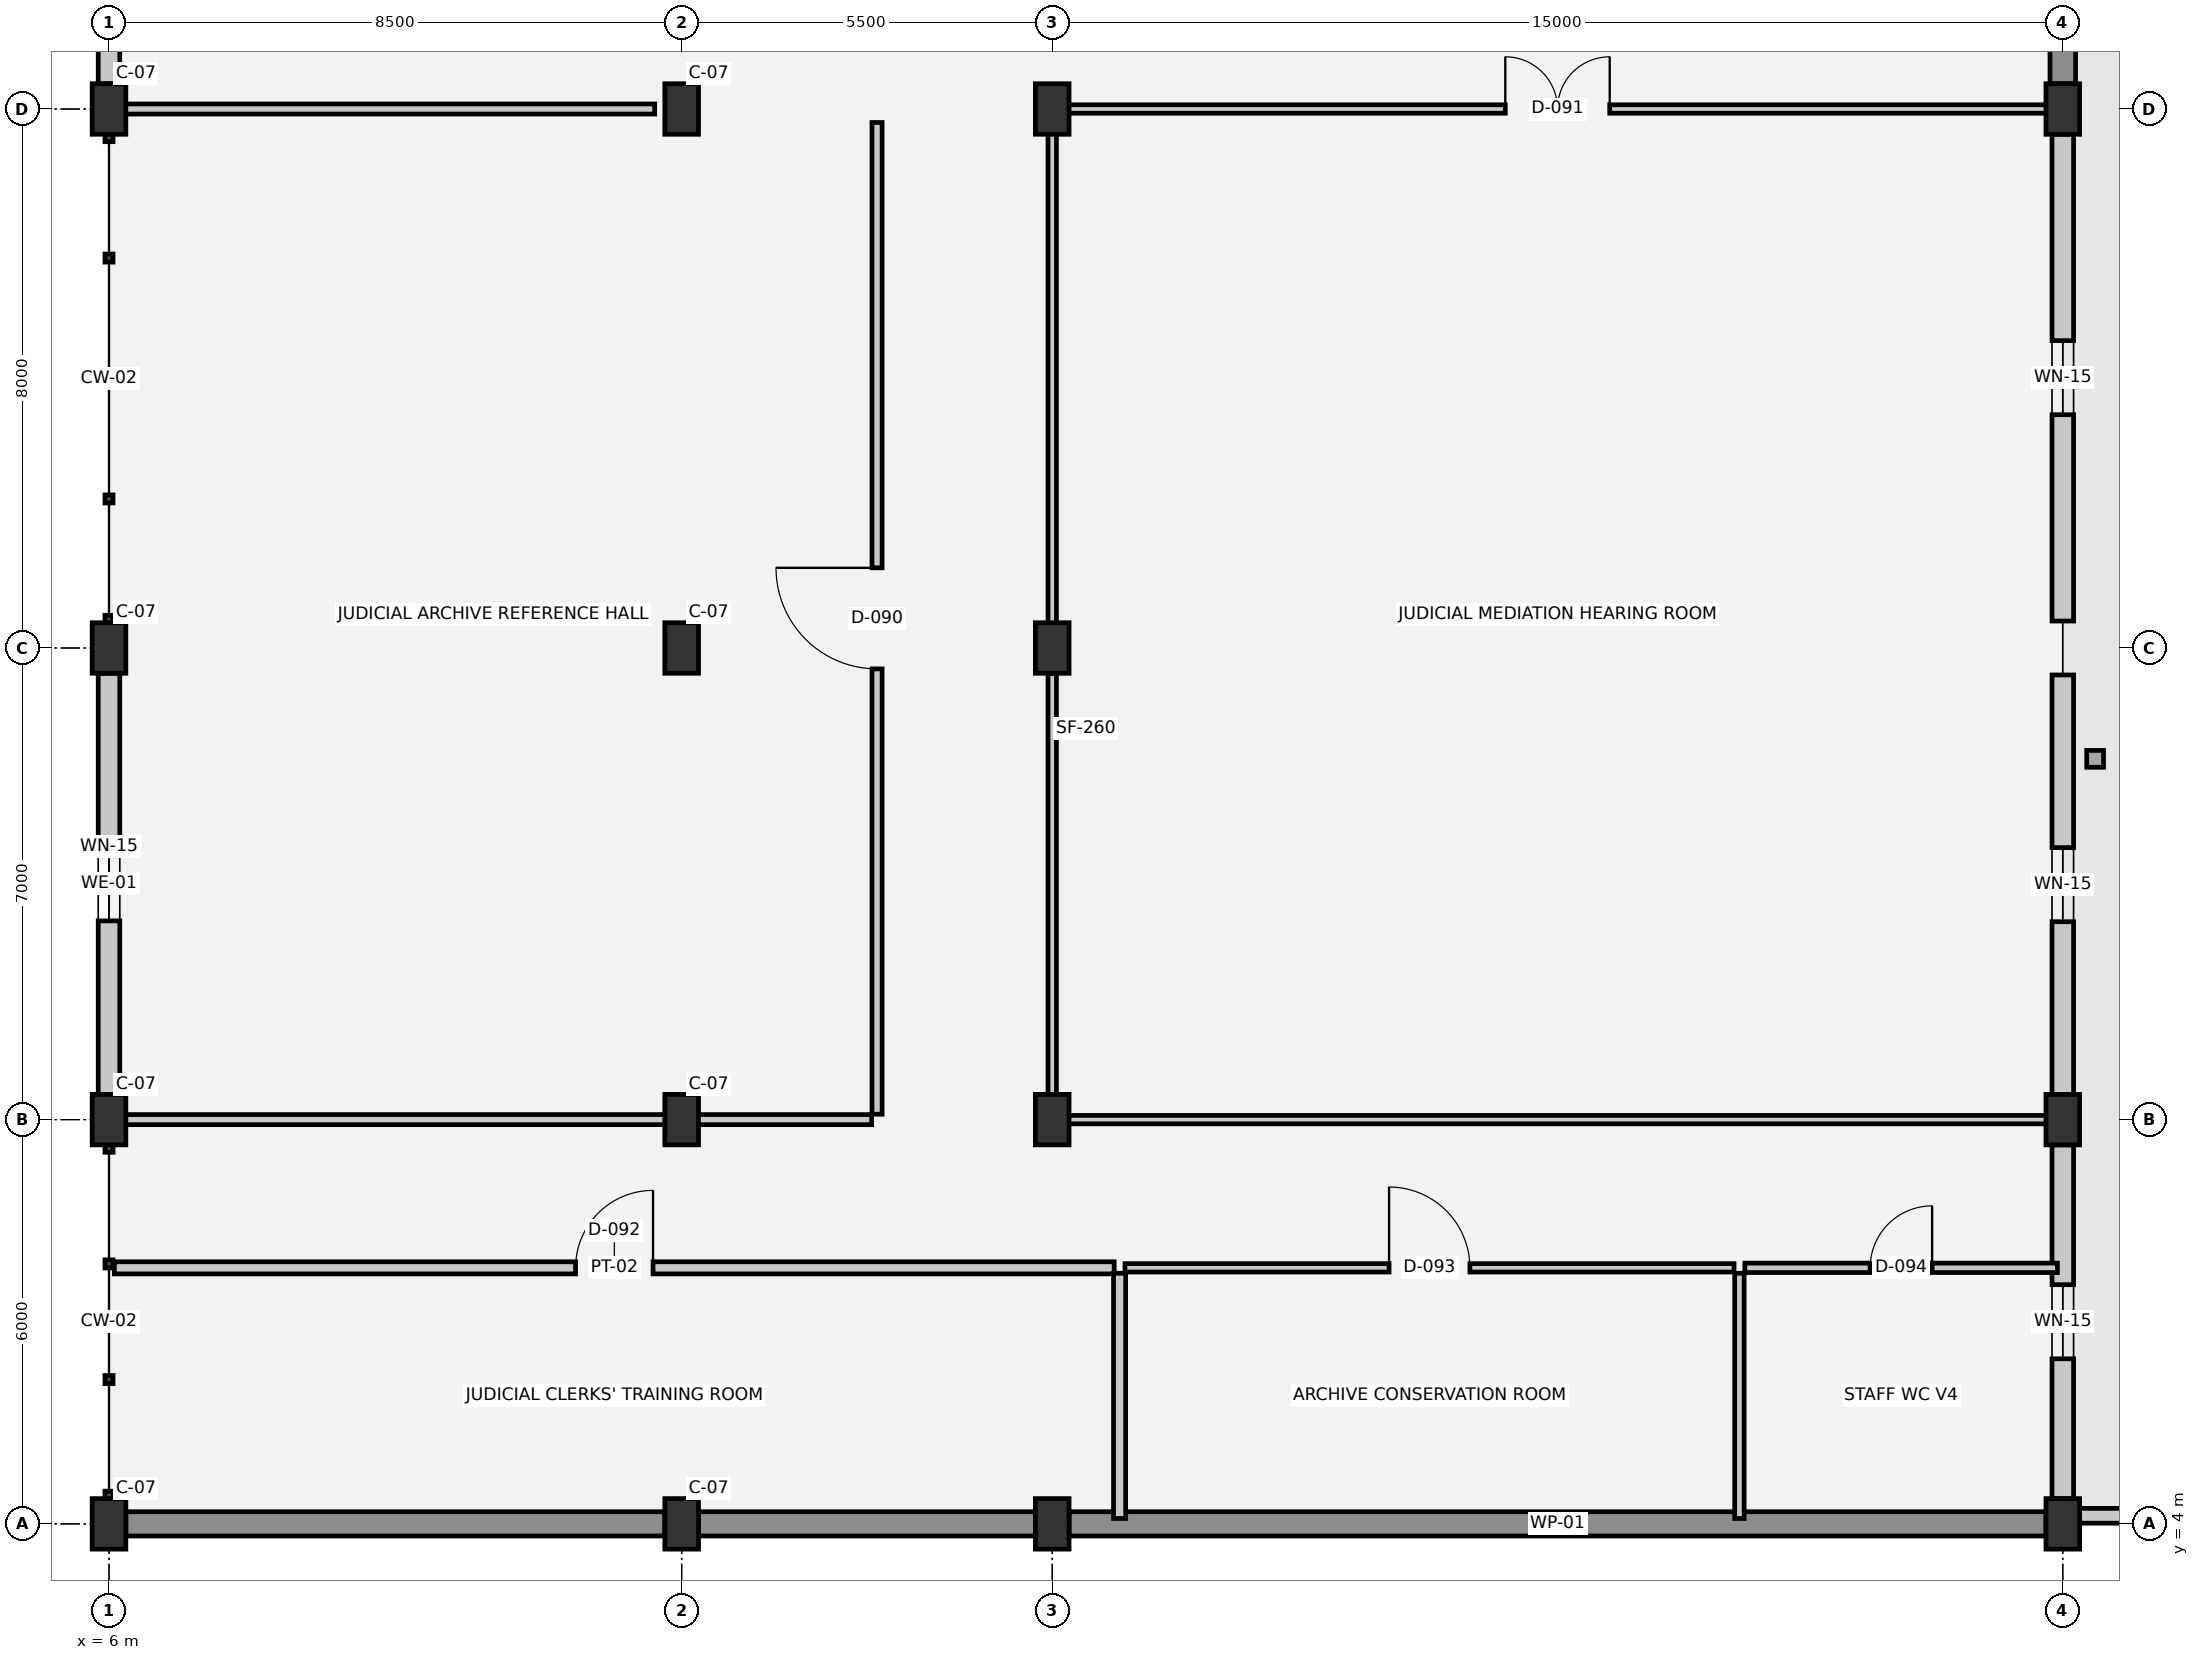
"""IFC4 building model, lengths in metres.
Left out: names, types, materials, properties, quantities, classifications, styles, units other than length and angle.
Written with IfcOpenShell. Run it as: python <this file> out.ifc"""

import sys

from ifc_helpers import new_model, si_unit, direction, frame, frame_2d, origin, origin_2d, place, context, subcontext, project, spatial, rectangle, extrude, element, fill, save


model = new_model("IFC4")
c1 = context("Model", 3, precision=1e-05, world=origin(), true_north=direction((0.0, 1.0)))
c2 = subcontext(c1, "Body", "Model", "MODEL_VIEW")
j1 = project(units=[si_unit("LENGTHUNIT", "METRE"), si_unit("PLANEANGLEUNIT", "RADIAN")], contexts=[c1])
p1 = place(None, origin())
s1 = spatial("IfcSite", under=j1, at=p1, CompositionType="ELEMENT")
p2 = place(p1, origin())
s2 = spatial("IfcBuilding", under=s1, at=p2, CompositionType="ELEMENT")
p3 = place(p2, frame((0.0, 0.0, 18.3)))
s3 = spatial("IfcBuildingStorey", under=s2, at=p3, CompositionType="ELEMENT", Elevation=18.3)
for number, where, z_axis, x_axis in (
    (1, (6.0, 4.0, 0.0), (0.0, 0.0, 1.0), (1.0, 0.0, 0.0)),
    (2, (6.0, 10.0, 0.0), (0.0, 0.0, 1.0), (1.0, 0.0, 0.0)),
    (3, (6.0, 17.0, 0.0), (0.0, 0.0, 1.0), (1.0, 0.0, 0.0)),
    (4, (6.0, 25.0, 0.0), (0.0, 0.0, 1.0), (1.0, 0.0, 0.0)),
    (5, (14.5, 4.0, 0.0), (0.0, 0.0, 1.0), (1.0, 0.0, 0.0)),
    (6, (14.5, 10.0, 0.0), (0.0, 0.0, 1.0), (1.0, 0.0, 0.0)),
    (7, (14.5, 17.0, 0.0), (0.0, 0.0, 1.0), (1.0, 0.0, 0.0)),
    (8, (14.5, 25.0, 0.0), (0.0, 0.0, 1.0), (1.0, 0.0, 0.0)),
    (9, (20.0, 4.0, 0.0), (0.0, 0.0, 1.0), (1.0, 0.0, 0.0)),
    (10, (20.0, 10.0, 0.0), (0.0, 0.0, 1.0), (1.0, 0.0, 0.0)),
    (11, (20.0, 17.0, 0.0), (0.0, 0.0, 1.0), (1.0, 0.0, 0.0)),
    (12, (20.0, 25.0, 0.0), (0.0, 0.0, 1.0), (1.0, 0.0, 0.0)),
    (13, (35.0, 4.0, 0.0), (0.0, 0.0, 1.0), (1.0, 0.0, 0.0)),
    (14, (35.0, 10.0, 0.0), (0.0, 0.0, 1.0), (1.0, 0.0, 0.0)),
    (15, (35.0, 25.0, 0.0), (0.0, 0.0, 1.0), (1.0, 0.0, 0.0)),
):
    element("IfcColumn", number, at=place(p3, frame(where, z_axis=z_axis, x_axis=x_axis)), inside=s3, PredefinedType="COLUMN", context=c2, shape_type="SweptSolid", body=[
        extrude(rectangle(XDim=0.5, YDim=0.75, at=origin_2d()), origin(), (0.0, 0.0, 1.0), 3.75),
    ])
p4 = place(p3, frame((6.0, 10.375, 0.0), z_axis=(0.0, 0.0, 1.0), x_axis=(0.0, 1.0, 0.0)))
e16 = element("IfcWall", 16, at=p4, inside=s3, PredefinedType="SOLIDWALL", context=c2, shape_type="SweptSolid", body=[
    extrude(rectangle(XDim=6.25, YDim=0.32, at=frame_2d((3.125, 0.0))), origin(), (0.0, 0.0, 1.0), 2.35),
])
p5 = place(p4, frame((2.575, 0.0, 0.9)))
e17 = element("IfcOpeningElement", 17, at=p5, cuts=e16, PredefinedType="OPENING", context=c2, shape_type="SweptSolid", body=[
    extrude(rectangle(XDim=1.1, YDim=1.2, at=frame_2d((0.55, 0.6))), frame((0.0, 0.17, 0.0), z_axis=(0.0, -1.0, 0.0), x_axis=(1.0, 0.0, 0.0)), (0.0, 0.0, 1.0), 0.34),
])
p6 = place(p3, frame((6.0, 25.375, 0.0), z_axis=(0.0, 0.0, 1.0), x_axis=(0.0, 1.0, 0.0)))
e18 = element("IfcWall", 18, at=p6, inside=s3, PredefinedType="SOLIDWALL", context=c2, shape_type="SweptSolid", body=[
    extrude(rectangle(XDim=6.25, YDim=0.32, at=frame_2d((3.125, 0.0))), origin(), (0.0, 0.0, 1.0), 2.35),
])
p7 = place(p3, frame((35.0, 31.625, 0.0), z_axis=(0.0, 0.0, 1.0), x_axis=(0.0, -1.0, 0.0)))
e19 = element("IfcWall", 19, at=p7, inside=s3, PredefinedType="STANDARD", context=c2, shape_type="SweptSolid", body=[
    extrude(rectangle(XDim=6.25, YDim=0.38, at=frame_2d((3.125, 0.0))), origin(), (0.0, 0.0, 1.0), 2.35),
])
p8 = place(p3, frame((35.0, 24.625, 0.0), z_axis=(0.0, 0.0, 1.0), x_axis=(0.0, -1.0, 0.0)))
e20 = element("IfcWall", 20, at=p8, inside=s3, PredefinedType="SOLIDWALL", context=c2, shape_type="SweptSolid", body=[
    extrude(rectangle(XDim=7.225, YDim=0.32, at=frame_2d((3.613, 0.0))), origin(), (0.0, 0.0, 1.0), 2.35),
])
p9 = place(p8, frame((3.062, 0.0, 0.9)))
e21 = element("IfcOpeningElement", 21, at=p9, cuts=e20, PredefinedType="OPENING", context=c2, shape_type="SweptSolid", body=[
    extrude(rectangle(XDim=1.1, YDim=1.2, at=frame_2d((0.55, 0.6))), frame((0.0, 0.17, 0.0), z_axis=(0.0, -1.0, 0.0), x_axis=(1.0, 0.0, 0.0)), (0.0, 0.0, 1.0), 0.34),
])
p10 = place(p3, frame((35.0, 16.6, 0.0), z_axis=(0.0, 0.0, 1.0), x_axis=(0.0, -1.0, 0.0)))
e22 = element("IfcWall", 22, at=p10, inside=s3, PredefinedType="SOLIDWALL", context=c2, shape_type="SweptSolid", body=[
    extrude(rectangle(XDim=6.225, YDim=0.32, at=frame_2d((3.113, 0.0))), origin(), (0.0, 0.0, 1.0), 2.35),
])
p11 = place(p10, frame((2.562, 0.0, 0.9)))
e23 = element("IfcOpeningElement", 23, at=p11, cuts=e22, PredefinedType="OPENING", context=c2, shape_type="SweptSolid", body=[
    extrude(rectangle(XDim=1.1, YDim=1.2, at=frame_2d((0.55, 0.6))), frame((0.0, 0.17, 0.0), z_axis=(0.0, -1.0, 0.0), x_axis=(1.0, 0.0, 0.0)), (0.0, 0.0, 1.0), 0.34),
])
p12 = place(p3, frame((35.0, 9.625, 0.0), z_axis=(0.0, 0.0, 1.0), x_axis=(0.0, -1.0, 0.0)))
e24 = element("IfcWall", 24, at=p12, inside=s3, PredefinedType="SOLIDWALL", context=c2, shape_type="SweptSolid", body=[
    extrude(rectangle(XDim=5.25, YDim=0.32, at=frame_2d((2.625, 0.0))), origin(), (0.0, 0.0, 1.0), 2.35),
])
p13 = place(p12, frame((2.075, 0.0, 0.9)))
e25 = element("IfcOpeningElement", 25, at=p13, cuts=e24, PredefinedType="OPENING", context=c2, shape_type="SweptSolid", body=[
    extrude(rectangle(XDim=1.1, YDim=1.2, at=frame_2d((0.55, 0.6))), frame((0.0, 0.17, 0.0), z_axis=(0.0, -1.0, 0.0), x_axis=(1.0, 0.0, 0.0)), (0.0, 0.0, 1.0), 0.34),
])
p14 = place(p3, frame((34.75, 4.0, 0.0), z_axis=(0.0, 0.0, 1.0), x_axis=(-1.0, 0.0, 0.0)))
e26 = element("IfcWall", 26, at=p14, inside=s3, PredefinedType="SOLIDWALL", context=c2, shape_type="SweptSolid", body=[
    extrude(rectangle(XDim=14.5, YDim=0.36, at=frame_2d((7.25, 0.0))), origin(), (0.0, 0.0, 1.0), 3.47),
])
p15 = place(p3, frame((19.75, 4.0, 0.0), z_axis=(0.0, 0.0, 1.0), x_axis=(-1.0, 0.0, 0.0)))
e27 = element("IfcWall", 27, at=p15, inside=s3, PredefinedType="SOLIDWALL", context=c2, shape_type="SweptSolid", body=[
    extrude(rectangle(XDim=5.0, YDim=0.36, at=frame_2d((2.5, 0.0))), origin(), (0.0, 0.0, 1.0), 3.47),
])
p16 = place(p3, frame((14.25, 4.0, 0.0), z_axis=(0.0, 0.0, 1.0), x_axis=(-1.0, 0.0, 0.0)))
e28 = element("IfcWall", 28, at=p16, inside=s3, PredefinedType="SOLIDWALL", context=c2, shape_type="SweptSolid", body=[
    extrude(rectangle(XDim=8.0, YDim=0.36, at=frame_2d((4.0, 0.0))), origin(), (0.0, 0.0, 1.0), 3.47),
])
p17 = place(p3, frame((55.77, 4.12, 0.0), z_axis=(0.0, 0.0, 1.0), x_axis=(-1.0, 0.0, 0.0)))
e29 = element("IfcWall", 29, at=p17, inside=s3, PredefinedType="PARAPET", context=c2, shape_type="SweptSolid", body=[
    extrude(rectangle(XDim=20.54, YDim=0.22, at=frame_2d((10.27, 0.0))), origin(), (0.0, 0.0, 1.0), 0.9),
])
p18 = place(p3, frame((6.08, 7.8, 0.0), z_axis=(0.0, 0.0, 1.0), x_axis=(1.0, 0.0, 0.0)))
e30 = element("IfcWall", 30, at=p18, inside=s3, PredefinedType="PARTITIONING", context=c2, shape_type="SweptSolid", body=[
    extrude(rectangle(XDim=14.84, YDim=0.18, at=frame_2d((7.42, 0.0))), origin(), (0.0, 0.0, 1.0), 3.39),
])
p19 = place(p18, frame((6.845, 0.0, 0.0)))
e31 = element("IfcOpeningElement", 31, at=p19, cuts=e30, PredefinedType="OPENING", context=c2, shape_type="SweptSolid", body=[
    extrude(rectangle(XDim=1.15, YDim=2.2, at=frame_2d((0.575, 1.1))), frame((0.0, 0.1, 0.0), z_axis=(0.0, -1.0, 0.0), x_axis=(1.0, 0.0, 0.0)), (0.0, 0.0, 1.0), 0.2),
])
p20 = place(p3, frame((21.08, 7.8, 0.0), z_axis=(0.0, 0.0, 1.0), x_axis=(1.0, 0.0, 0.0)))
e32 = element("IfcWall", 32, at=p20, inside=s3, PredefinedType="PARTITIONING", context=c2, shape_type="SweptSolid", body=[
    extrude(rectangle(XDim=9.04, YDim=0.125, at=frame_2d((4.52, 0.0))), origin(), (0.0, 0.0, 1.0), 3.39),
])
p21 = place(p20, frame((3.92, 0.0, 0.0)))
e33 = element("IfcOpeningElement", 33, at=p21, cuts=e32, PredefinedType="OPENING", context=c2, shape_type="SweptSolid", body=[
    extrude(rectangle(XDim=1.2, YDim=2.15, at=frame_2d((0.6, 1.075))), frame((0.0, 0.073, 0.0), z_axis=(0.0, -1.0, 0.0), x_axis=(1.0, 0.0, 0.0)), (0.0, 0.0, 1.0), 0.145),
])
p22 = place(p3, frame((30.28, 7.8, 0.0), z_axis=(0.0, 0.0, 1.0), x_axis=(1.0, 0.0, 0.0)))
e34 = element("IfcWall", 34, at=p22, inside=s3, PredefinedType="PLUMBINGWALL", context=c2, shape_type="SweptSolid", body=[
    extrude(rectangle(XDim=4.64, YDim=0.14, at=frame_2d((2.32, 0.0))), origin(), (0.0, 0.0, 1.0), 3.39),
])
p23 = place(p22, frame((1.86, 0.0, 0.0)))
e35 = element("IfcOpeningElement", 35, at=p23, cuts=e34, PredefinedType="OPENING", context=c2, shape_type="SweptSolid", body=[
    extrude(rectangle(XDim=0.92, YDim=2.1, at=frame_2d((0.46, 1.05))), frame((0.0, 0.08, 0.0), z_axis=(0.0, -1.0, 0.0), x_axis=(1.0, 0.0, 0.0)), (0.0, 0.0, 1.0), 0.16),
])
p24 = place(p3, frame((6.08, 10.0, 0.0), z_axis=(0.0, 0.0, 1.0), x_axis=(1.0, 0.0, 0.0)))
e36 = element("IfcWall", 36, at=p24, inside=s3, PredefinedType="PARTITIONING", context=c2, shape_type="SweptSolid", body=[
    extrude(rectangle(XDim=11.24, YDim=0.15, at=frame_2d((5.62, 0.0))), origin(), (0.0, 0.0, 1.0), 2.77),
])
p25 = place(p3, frame((20.08, 10.0, 0.0), z_axis=(0.0, 0.0, 1.0), x_axis=(1.0, 0.0, 0.0)))
e37 = element("IfcWall", 37, at=p25, inside=s3, PredefinedType="PARTITIONING", context=c2, shape_type="SweptSolid", body=[
    extrude(rectangle(XDim=14.84, YDim=0.125, at=frame_2d((7.42, 0.0))), origin(), (0.0, 0.0, 1.0), 2.52),
])
p26 = place(p3, frame((6.08, 25.0, 0.0), z_axis=(0.0, 0.0, 1.0), x_axis=(1.0, 0.0, 0.0)))
e38 = element("IfcWall", 38, at=p26, inside=s3, PredefinedType="PARTITIONING", context=c2, shape_type="SweptSolid", body=[
    extrude(rectangle(XDim=8.02, YDim=0.15, at=frame_2d((4.01, 0.0))), origin(), (0.0, 0.0, 1.0), 2.77),
])
p27 = place(p3, frame((20.08, 25.0, 0.0), z_axis=(0.0, 0.0, 1.0), x_axis=(1.0, 0.0, 0.0)))
e39 = element("IfcWall", 39, at=p27, inside=s3, PredefinedType="PARTITIONING", context=c2, shape_type="SweptSolid", body=[
    extrude(rectangle(XDim=14.84, YDim=0.125, at=frame_2d((7.42, 0.0))), origin(), (0.0, 0.0, 1.0), 2.52),
])
p28 = place(p27, frame((6.645, 0.0, 0.0)))
e40 = element("IfcOpeningElement", 40, at=p28, cuts=e39, PredefinedType="OPENING", context=c2, shape_type="SweptSolid", body=[
    extrude(rectangle(XDim=1.55, YDim=2.25, at=frame_2d((0.775, 1.125))), frame((0.0, 0.073, 0.0), z_axis=(0.0, -1.0, 0.0), x_axis=(1.0, 0.0, 0.0)), (0.0, 0.0, 1.0), 0.145),
])
p29 = place(p3, frame((17.4, 10.08, 0.0), z_axis=(0.0, 0.0, 1.0), x_axis=(0.0, 1.0, 0.0)))
e41 = element("IfcWall", 41, at=p29, inside=s3, PredefinedType="PARTITIONING", context=c2, shape_type="SweptSolid", body=[
    extrude(rectangle(XDim=14.72, YDim=0.15, at=frame_2d((7.36, 0.0))), origin(), (0.0, 0.0, 1.0), 3.39),
])
p30 = place(p29, frame((6.61, 0.0, 0.0)))
e42 = element("IfcOpeningElement", 42, at=p30, cuts=e41, PredefinedType="OPENING", context=c2, shape_type="SweptSolid", body=[
    extrude(rectangle(XDim=1.5, YDim=2.25, at=frame_2d((0.75, 1.125))), frame((0.0, 0.085, 0.0), z_axis=(0.0, -1.0, 0.0), x_axis=(1.0, 0.0, 0.0)), (0.0, 0.0, 1.0), 0.17),
])
p31 = place(p3, frame((20.0, 10.08, 0.0), z_axis=(0.0, 0.0, 1.0), x_axis=(0.0, 1.0, 0.0)))
e43 = element("IfcWall", 43, at=p31, inside=s3, PredefinedType="PARTITIONING", context=c2, shape_type="SweptSolid", body=[
    extrude(rectangle(XDim=6.545, YDim=0.125, at=frame_2d((3.272, 0.0))), origin(), (0.0, 0.0, 1.0), 2.995),
])
p32 = place(p3, frame((20.0, 16.625, 0.0), z_axis=(0.0, 0.0, 1.0), x_axis=(0.0, 1.0, 0.0)))
e44 = element("IfcWall", 44, at=p32, inside=s3, PredefinedType="PARTITIONING", context=c2, shape_type="SweptSolid", body=[
    extrude(rectangle(XDim=8.295, YDim=0.125, at=frame_2d((4.147, 0.0))), origin(), (0.0, 0.0, 1.0), 2.77),
])
p33 = place(p3, frame((21.0, 4.08, 0.0), z_axis=(0.0, 0.0, 1.0), x_axis=(0.0, 1.0, 0.0)))
e45 = element("IfcWall", 45, at=p33, inside=s3, PredefinedType="PARTITIONING", context=c2, shape_type="SweptSolid", body=[
    extrude(rectangle(XDim=3.64, YDim=0.18, at=frame_2d((1.82, 0.0))), origin(), (0.0, 0.0, 1.0), 3.39),
])
p34 = place(p3, frame((30.2, 4.08, 0.0), z_axis=(0.0, 0.0, 1.0), x_axis=(0.0, 1.0, 0.0)))
e46 = element("IfcWall", 46, at=p34, inside=s3, PredefinedType="PLUMBINGWALL", context=c2, shape_type="SweptSolid", body=[
    extrude(rectangle(XDim=3.64, YDim=0.14, at=frame_2d((1.82, 0.0))), origin(), (0.0, 0.0, 1.0), 3.39),
])
p35 = place(p5, origin())
e47 = element("IfcWindow", 47, at=p35, inside=s3, PartitioningType="SINGLE_PANEL", PredefinedType="WINDOW", context=c2, shape_type="SweptSolid", body=[
    extrude(rectangle(XDim=1.1, YDim=1.2, at=frame_2d((0.55, 0.6))), frame((0.0, 0.03, 0.0), z_axis=(0.0, -1.0, 0.0), x_axis=(1.0, 0.0, 0.0)), (0.0, 0.0, 1.0), 0.06),
])
fill(e17, e47)
p36 = place(p9, origin())
e48 = element("IfcWindow", 48, at=p36, inside=s3, PartitioningType="SINGLE_PANEL", PredefinedType="WINDOW", context=c2, shape_type="SweptSolid", body=[
    extrude(rectangle(XDim=1.1, YDim=1.2, at=frame_2d((0.55, 0.6))), frame((0.0, 0.03, 0.0), z_axis=(0.0, -1.0, 0.0), x_axis=(1.0, 0.0, 0.0)), (0.0, 0.0, 1.0), 0.06),
])
fill(e21, e48)
p37 = place(p11, origin())
e49 = element("IfcWindow", 49, at=p37, inside=s3, PartitioningType="SINGLE_PANEL", PredefinedType="WINDOW", context=c2, shape_type="SweptSolid", body=[
    extrude(rectangle(XDim=1.1, YDim=1.2, at=frame_2d((0.55, 0.6))), frame((0.0, 0.03, 0.0), z_axis=(0.0, -1.0, 0.0), x_axis=(1.0, 0.0, 0.0)), (0.0, 0.0, 1.0), 0.06),
])
fill(e23, e49)
p38 = place(p13, origin())
e50 = element("IfcWindow", 50, at=p38, inside=s3, PartitioningType="SINGLE_PANEL", PredefinedType="WINDOW", context=c2, shape_type="SweptSolid", body=[
    extrude(rectangle(XDim=1.1, YDim=1.2, at=frame_2d((0.55, 0.6))), frame((0.0, 0.03, 0.0), z_axis=(0.0, -1.0, 0.0), x_axis=(1.0, 0.0, 0.0)), (0.0, 0.0, 1.0), 0.06),
])
fill(e25, e50)
p39 = place(p30, origin())
e51 = element("IfcDoor", 51, at=p39, inside=s3, OperationType="SINGLE_SWING_RIGHT", PredefinedType="DOOR", context=c2, shape_type="SweptSolid", body=[
    extrude(rectangle(XDim=1.5, YDim=2.25, at=frame_2d((0.75, 1.125))), frame((0.0, 0.025, 0.0), z_axis=(0.0, -1.0, 0.0), x_axis=(1.0, 0.0, 0.0)), (0.0, 0.0, 1.0), 0.05),
])
fill(e42, e51)
p40 = place(p28, origin())
e52 = element("IfcDoor", 52, at=p40, inside=s3, OperationType="DOUBLE_DOOR_SINGLE_SWING", PredefinedType="DOOR", context=c2, shape_type="SweptSolid", body=[
    extrude(rectangle(XDim=1.55, YDim=2.25, at=frame_2d((0.775, 1.125))), frame((0.0, 0.025, 0.0), z_axis=(0.0, -1.0, 0.0), x_axis=(1.0, 0.0, 0.0)), (0.0, 0.0, 1.0), 0.05),
])
fill(e40, e52)
p41 = place(p19, origin())
e53 = element("IfcDoor", 53, at=p41, inside=s3, OperationType="SINGLE_SWING_RIGHT", PredefinedType="DOOR", context=c2, shape_type="SweptSolid", body=[
    extrude(rectangle(XDim=1.15, YDim=2.2, at=frame_2d((0.575, 1.1))), frame((0.0, 0.025, 0.0), z_axis=(0.0, -1.0, 0.0), x_axis=(1.0, 0.0, 0.0)), (0.0, 0.0, 1.0), 0.05),
])
fill(e31, e53)
p42 = place(p21, origin())
e54 = element("IfcDoor", 54, at=p42, inside=s3, OperationType="SINGLE_SWING_LEFT", PredefinedType="DOOR", context=c2, shape_type="SweptSolid", body=[
    extrude(rectangle(XDim=1.2, YDim=2.15, at=frame_2d((0.6, 1.075))), frame((0.0, 0.025, 0.0), z_axis=(0.0, -1.0, 0.0), x_axis=(1.0, 0.0, 0.0)), (0.0, 0.0, 1.0), 0.05),
])
fill(e33, e54)
p43 = place(p23, origin())
e55 = element("IfcDoor", 55, at=p43, inside=s3, OperationType="SINGLE_SWING_RIGHT", PredefinedType="DOOR", context=c2, shape_type="SweptSolid", body=[
    extrude(rectangle(XDim=0.92, YDim=2.1, at=frame_2d((0.46, 1.05))), frame((0.0, 0.025, 0.0), z_axis=(0.0, -1.0, 0.0), x_axis=(1.0, 0.0, 0.0)), (0.0, 0.0, 1.0), 0.05),
])
fill(e35, e55)
save(model, sys.argv[1])
